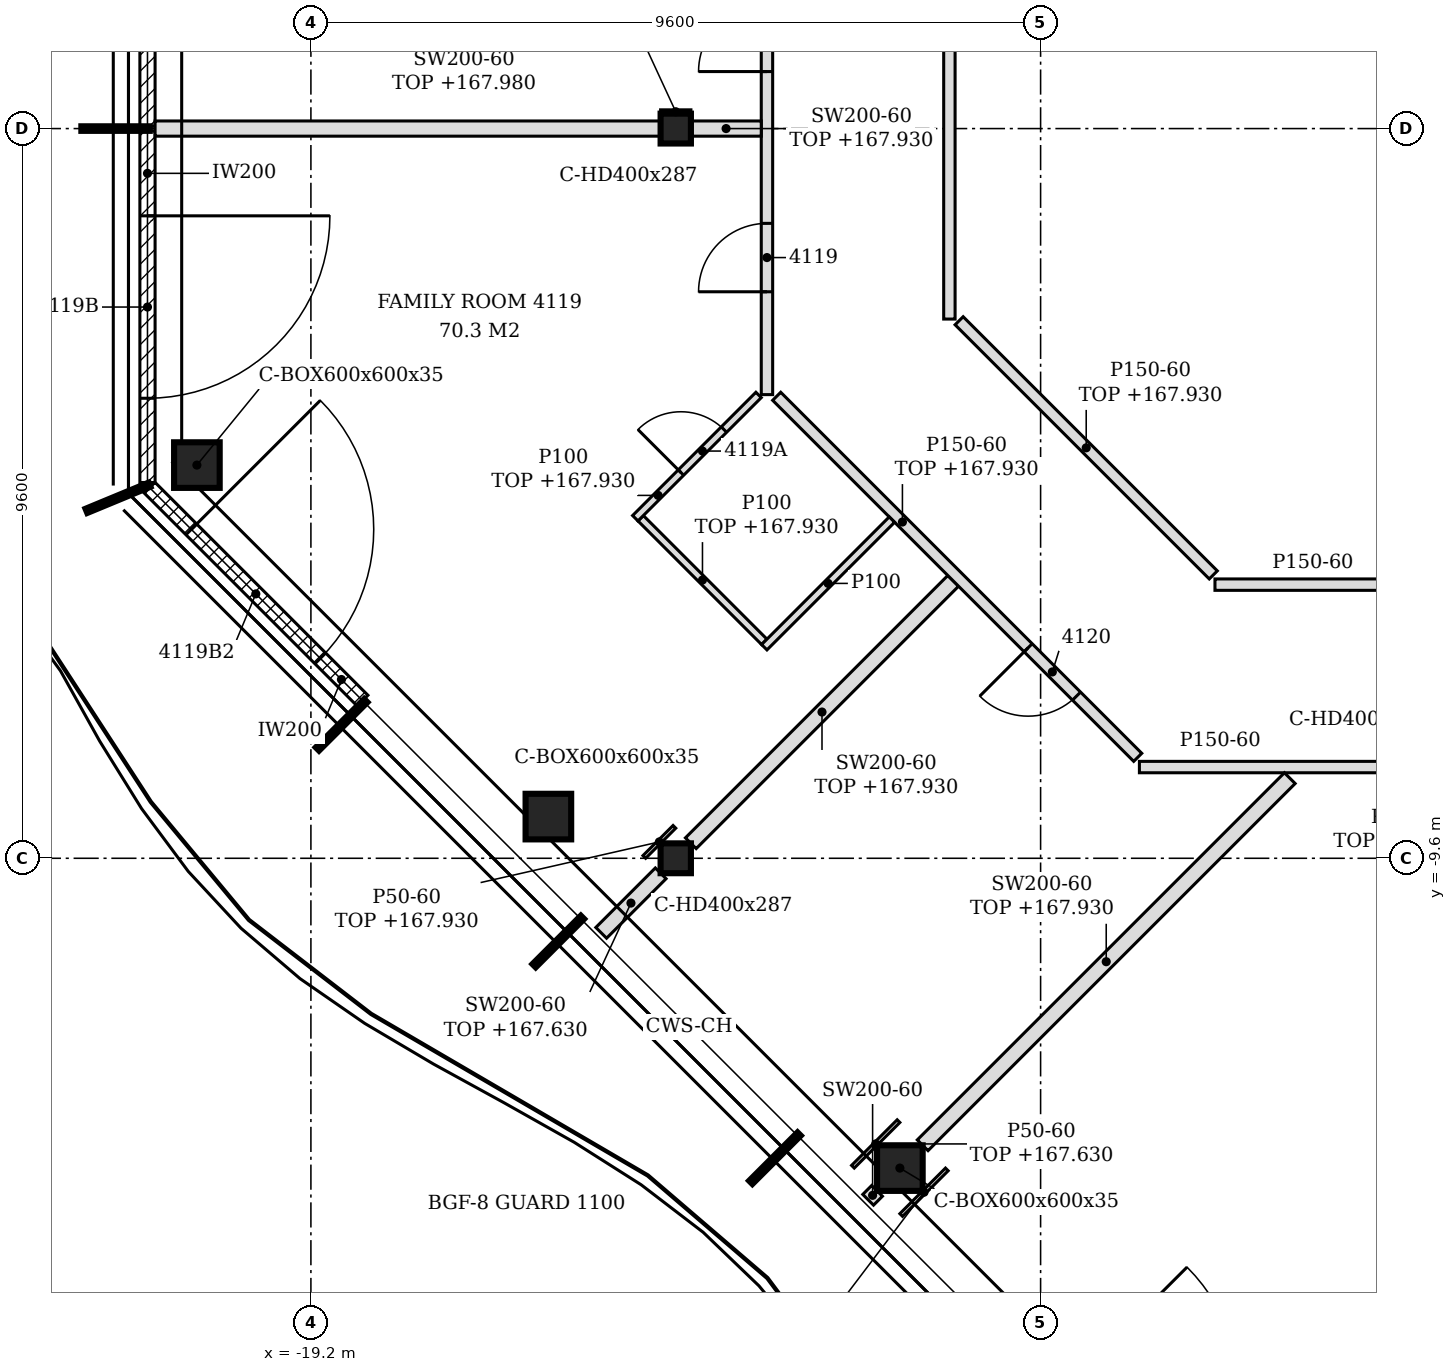
"""IFC4 building model, lengths in metres.
Left out: names, types, materials, properties, quantities, classifications, styles, units other than length and angle.
Written with IfcOpenShell. Run it as: python <this file> out.ifc"""

import sys

from ifc_helpers import new_model, si_unit, direction, frame, frame_2d, origin, origin_2d, place, context, subcontext, project, spatial, polyline, rectangle, hollow_rectangle, i_section, outline, extrude, element, fill, save


model = new_model("IFC4")
c1 = context("Model", 3, precision=1e-05, world=origin(), true_north=direction((0.0, 1.0)))
c2 = subcontext(c1, "Body", "Model", "MODEL_VIEW")
j1 = project(units=[si_unit("LENGTHUNIT", "METRE"), si_unit("PLANEANGLEUNIT", "RADIAN")], contexts=[c1])
p1 = place(None, origin())
s1 = spatial("IfcSite", under=j1, at=p1, CompositionType="ELEMENT")
p2 = place(p1, origin())
s2 = spatial("IfcBuilding", under=s1, at=p2, CompositionType="ELEMENT")
p3 = place(p2, frame((0.0, 0.0, 165.0)))
s3 = spatial("IfcBuildingStorey", under=s2, at=p3, CompositionType="ELEMENT", Elevation=165.0)
for number, where, z_axis, x_axis in (
    (1, (-20.7, -4.427, -0.15), (0.0, 0.0, 1.0), (1.0, 0.0, 0.0)),
    (2, (-16.076, -9.052, -0.15), (0.0, 0.0, 1.0), (1.0, 0.0, 0.0)),
    (3, (-11.451, -13.676, -0.15), (0.0, 0.0, 1.0), (1.0, 0.0, 0.0)),
):
    element("IfcColumn", number, at=place(p3, frame(where, z_axis=z_axis, x_axis=x_axis)), inside=s3, PredefinedType="COLUMN", context=c2, shape_type="SweptSolid", body=[
        extrude(hollow_rectangle(XDim=0.6, YDim=0.6, WallThickness=0.035, at=origin_2d()), origin(), (0.0, 0.0, 1.0), 3.6),
    ])
for number, where, z_axis, x_axis in (
    (4, (-14.4, -9.6, -0.15), (0.0, 0.0, 1.0), (1.0, 0.0, 0.0)),
    (5, (-14.4, 0.0, -0.15), (0.0, 0.0, 1.0), (1.0, 0.0, 0.0)),
):
    element("IfcColumn", number, at=place(p3, frame(where, z_axis=z_axis, x_axis=x_axis)), inside=s3, PredefinedType="COLUMN", context=c2, shape_type="SweptSolid", body=[
        extrude(i_section(OverallWidth=0.399, OverallDepth=0.393, WebThickness=0.023, FlangeThickness=0.037, FilletRadius=0.015, at=origin_2d()), origin(), (0.0, 0.0, 1.0), 3.6),
    ])
p4 = place(p3, frame((-21.35, 4.77, 0.0), z_axis=(0.0, 0.0, 1.0), x_axis=(0.0, -1.0, 0.0)))
e6 = element("IfcWall", 6, at=p4, inside=s3, PredefinedType="NOTDEFINED", context=c2, shape_type="SweptSolid", body=[
    extrude(rectangle(XDim=4.74, YDim=0.2, at=frame_2d((2.37, 0.0))), origin(), (0.0, 0.0, 1.0), 3.45),
])
p5 = place(p4, frame((1.17, 0.0, 0.0)))
e7 = element("IfcOpeningElement", 7, at=p5, cuts=e6, PredefinedType="OPENING", context=c2, shape_type="SweptSolid", body=[
    extrude(rectangle(XDim=2.4, YDim=2.4, at=frame_2d((1.2, 1.2))), frame((0.0, 0.11, 0.0), z_axis=(0.0, -1.0, 0.0), x_axis=(1.0, 0.0, 0.0)), (0.0, 0.0, 1.0), 0.22),
])
p6 = place(p3, frame((-21.35, -0.03, 0.0), z_axis=(0.0, 0.0, 1.0), x_axis=(0.0, -1.0, 0.0)))
e8 = element("IfcWall", 8, at=p6, inside=s3, PredefinedType="NOTDEFINED", context=c2, shape_type="SweptSolid", body=[
    extrude(rectangle(XDim=4.626, YDim=0.2, at=frame_2d((2.313, 0.0))), origin(), (0.0, 0.0, 1.0), 3.45),
])
p7 = place(p6, frame((1.118, 0.0, 0.0)))
e9 = element("IfcOpeningElement", 9, at=p7, cuts=e8, PredefinedType="OPENING", context=c2, shape_type="SweptSolid", body=[
    extrude(rectangle(XDim=2.4, YDim=2.4, at=frame_2d((1.2, 1.2))), frame((0.0, 0.11, 0.0), z_axis=(0.0, -1.0, 0.0), x_axis=(1.0, 0.0, 0.0)), (0.0, 0.0, 1.0), 0.22),
])
p8 = place(p3, frame((-21.322, -4.725, 0.0), z_axis=(0.0, 0.0, 1.0), x_axis=(0.707106781187, -0.707106781187, 0.0)))
e10 = element("IfcWall", 10, at=p8, inside=s3, PredefinedType="NOTDEFINED", context=c2, shape_type="SweptSolid", body=[
    extrude(rectangle(XDim=3.962, YDim=0.2, at=frame_2d((1.981, 0.0))), origin(), (0.0, 0.0, 1.0), 3.45),
])
p9 = place(p8, frame((0.775, 0.0, 0.0)))
e11 = element("IfcOpeningElement", 11, at=p9, cuts=e10, PredefinedType="OPENING", context=c2, shape_type="SweptSolid", body=[
    extrude(rectangle(XDim=2.4, YDim=2.4, at=frame_2d((1.2, 1.2))), frame((0.0, 0.11, 0.0), z_axis=(0.0, -1.0, 0.0), x_axis=(1.0, 0.0, 0.0)), (0.0, 0.0, 1.0), 0.22),
])
p10 = place(p3, frame((-11.869, -14.093, 0.0), z_axis=(0.0, 0.0, 1.0), x_axis=(0.707106781187, 0.707106781187, 0.0)))
e12 = element("IfcWall", 12, at=p10, inside=s3, PredefinedType="PARTITIONING", context=c2, shape_type="SweptSolid", body=[
    extrude(rectangle(XDim=0.166, YDim=0.2, at=frame_2d((0.083, 0.0))), origin(), (0.0, 0.0, 1.0), 3.45),
])
p11 = place(p3, frame((-11.152, -13.375, 0.0), z_axis=(0.0, 0.0, 1.0), x_axis=(0.707106781187, 0.707106781187, 0.0)))
e13 = element("IfcWall", 13, at=p11, inside=s3, PredefinedType="PARTITIONING", context=c2, shape_type="SweptSolid", body=[
    extrude(rectangle(XDim=6.83, YDim=0.2, at=frame_2d((3.415, 0.0))), origin(), (0.0, 0.0, 1.0), 2.93),
])
p12 = place(p3, frame((-15.381, -10.581, 0.0), z_axis=(0.0, 0.0, 1.0), x_axis=(0.707217034054, 0.706996511125, 0.0)))
e14 = element("IfcWall", 14, at=p12, inside=s3, PredefinedType="PARTITIONING", context=c2, shape_type="SweptSolid", body=[
    extrude(rectangle(XDim=1.107, YDim=0.2, at=frame_2d((0.554, 0.0))), origin(), (0.0, 0.0, 1.0), 2.63),
])
p13 = place(p3, frame((-14.202, -9.402, 0.0), z_axis=(0.0, 0.0, 1.0), x_axis=(0.707081776084, 0.707131785404, 0.0)))
e15 = element("IfcWall", 15, at=p13, inside=s3, PredefinedType="PARTITIONING", context=c2, shape_type="SweptSolid", body=[
    extrude(rectangle(XDim=4.882, YDim=0.2, at=frame_2d((2.441, 0.0))), origin(), (0.0, 0.0, 1.0), 2.93),
])
p14 = place(p3, frame((-8.3, -8.4, 0.0), z_axis=(0.0, 0.0, 1.0), x_axis=(1.0, 0.0, 0.0)))
e16 = element("IfcWall", 16, at=p14, inside=s3, PredefinedType="PARTITIONING", context=c2, shape_type="SweptSolid", body=[
    extrude(rectangle(XDim=3.301, YDim=0.15, at=frame_2d((1.65, 0.0))), origin(), (0.0, 0.0, 1.0), 3.45),
])
p15 = place(p3, frame((-8.322, -8.272, 0.0), z_axis=(0.0, 0.0, 1.0), x_axis=(-0.707106781187, 0.707106781187, 0.0)))
e17 = element("IfcWall", 17, at=p15, inside=s3, PredefinedType="PARTITIONING", context=c2, shape_type="SweptSolid", body=[
    extrude(rectangle(XDim=6.718, YDim=0.15, at=frame_2d((3.359, 0.0))), origin(), (0.0, 0.0, 1.0), 2.93),
])
p16 = place(p15, frame((1.139, 0.0, 0.0)))
e18 = element("IfcOpeningElement", 18, at=p16, cuts=e17, PredefinedType="OPENING", context=c2, shape_type="SweptSolid", body=[
    extrude(rectangle(XDim=0.9, YDim=2.1, at=frame_2d((0.45, 1.05))), frame((0.0, 0.085, 0.0), z_axis=(0.0, -1.0, 0.0), x_axis=(1.0, 0.0, 0.0)), (0.0, 0.0, 1.0), 0.17),
])
p17 = place(p3, frame((-13.235, -6.753, 0.0), z_axis=(0.0, 0.0, 1.0), x_axis=(-0.707106781187, 0.707106781187, 0.0)))
e19 = element("IfcWall", 19, at=p17, inside=s3, PredefinedType="PARTITIONING", context=c2, shape_type="SweptSolid", body=[
    extrude(rectangle(XDim=2.3, YDim=0.1, at=frame_2d((1.15, 0.0))), origin(), (0.0, 0.0, 1.0), 2.93),
])
p18 = place(p3, frame((-13.235, -6.823, 0.0), z_axis=(0.0, 0.0, 1.0), x_axis=(0.707106781187, 0.707106781187, 0.0)))
e20 = element("IfcWall", 20, at=p18, inside=s3, PredefinedType="PARTITIONING", context=c2, shape_type="SweptSolid", body=[
    extrude(rectangle(XDim=2.375, YDim=0.1, at=frame_2d((1.188, 0.0))), origin(), (0.0, 0.0, 1.0), 3.45),
])
p19 = place(p3, frame((-7.306, -6.0, 0.0), z_axis=(0.0, 0.0, 1.0), x_axis=(1.0, 0.0, 0.0)))
e21 = element("IfcWall", 21, at=p19, inside=s3, PredefinedType="PARTITIONING", context=c2, shape_type="SweptSolid", body=[
    extrude(outline(polyline([(0.0, 0.0), (2.581, 0.0), (2.581, 2.83), (2.356, 2.83), (2.354, 3.45), (0.0, 3.45), (0.0, 0.0)])), frame((0.0, 0.075, 0.0), z_axis=(0.0, -1.0, 0.0), x_axis=(1.0, 0.0, 0.0)), (0.0, 0.0, 1.0), 0.15),
])
p20 = place(p3, frame((-7.328, -5.872, 0.0), z_axis=(0.0, 0.0, 1.0), x_axis=(-0.707106781187, 0.707106781187, 0.0)))
e22 = element("IfcWall", 22, at=p20, inside=s3, PredefinedType="PARTITIONING", context=c2, shape_type="SweptSolid", body=[
    extrude(rectangle(XDim=4.729, YDim=0.15, at=frame_2d((2.365, 0.0))), origin(), (0.0, 0.0, 1.0), 2.93),
])
p21 = place(p3, frame((-14.932, -5.126, 0.0), z_axis=(0.0, 0.0, 1.0), x_axis=(0.707106781187, 0.707106781187, 0.0)))
e23 = element("IfcWall", 23, at=p21, inside=s3, PredefinedType="PARTITIONING", context=c2, shape_type="SweptSolid", body=[
    extrude(rectangle(XDim=2.294, YDim=0.1, at=frame_2d((1.147, 0.0))), origin(), (0.0, 0.0, 1.0), 2.93),
])
p22 = place(p21, frame((0.85, 0.0, 0.0)))
e24 = element("IfcOpeningElement", 24, at=p22, cuts=e23, PredefinedType="OPENING", context=c2, shape_type="SweptSolid", body=[
    extrude(rectangle(XDim=0.8, YDim=2.1, at=frame_2d((0.4, 1.05))), frame((0.0, 0.06, 0.0), z_axis=(0.0, -1.0, 0.0), x_axis=(1.0, 0.0, 0.0)), (0.0, 0.0, 1.0), 0.12),
])
p23 = place(p3, frame((-13.2, -3.5, 0.0), z_axis=(0.0, 0.0, 1.0), x_axis=(0.0, 1.0, 0.0)))
e25 = element("IfcWall", 25, at=p23, inside=s3, PredefinedType="PARTITIONING", context=c2, shape_type="SweptSolid", body=[
    extrude(outline(polyline([(0.0, 0.0), (17.634, 0.0), (17.634, 3.45), (13.2, 3.45), (13.198, 2.93), (13.0, 2.93), (12.998, 3.45), (8.4, 3.45), (8.398, 2.93), (8.2, 2.93), (8.198, 3.45), (3.6, 3.45), (3.598, 2.93), (3.4, 2.93), (3.398, 3.45), (0.0, 3.45), (0.0, 0.0)])), frame((0.0, 0.075, 0.0), z_axis=(0.0, -1.0, 0.0), x_axis=(1.0, 0.0, 0.0)), (0.0, 0.0, 1.0), 0.15),
])
p24 = place(p23, frame((15.784, 0.0, 0.0)))
e26 = element("IfcOpeningElement", 26, at=p24, cuts=e25, PredefinedType="OPENING", context=c2, shape_type="SweptSolid", body=[
    extrude(rectangle(XDim=0.9, YDim=2.1, at=frame_2d((0.45, 1.05))), frame((0.0, 0.085, 0.0), z_axis=(0.0, -1.0, 0.0), x_axis=(1.0, 0.0, 0.0)), (0.0, 0.0, 1.0), 0.17),
])
p25 = place(p23, frame((11.45, 0.0, 0.0)))
e27 = element("IfcOpeningElement", 27, at=p25, cuts=e25, PredefinedType="OPENING", context=c2, shape_type="SweptSolid", body=[
    extrude(rectangle(XDim=0.9, YDim=2.1, at=frame_2d((0.45, 1.05))), frame((0.0, 0.085, 0.0), z_axis=(0.0, -1.0, 0.0), x_axis=(1.0, 0.0, 0.0)), (0.0, 0.0, 1.0), 0.17),
])
p26 = place(p23, frame((4.25, 0.0, 0.0)))
e28 = element("IfcOpeningElement", 28, at=p26, cuts=e25, PredefinedType="OPENING", context=c2, shape_type="SweptSolid", body=[
    extrude(rectangle(XDim=0.9, YDim=2.1, at=frame_2d((0.45, 1.05))), frame((0.0, 0.085, 0.0), z_axis=(0.0, -1.0, 0.0), x_axis=(1.0, 0.0, 0.0)), (0.0, 0.0, 1.0), 0.17),
])
p27 = place(p23, frame((1.353, 0.0, 0.0)))
e29 = element("IfcOpeningElement", 29, at=p27, cuts=e25, PredefinedType="OPENING", context=c2, shape_type="SweptSolid", body=[
    extrude(rectangle(XDim=0.9, YDim=2.1, at=frame_2d((0.45, 1.05))), frame((0.0, 0.085, 0.0), z_axis=(0.0, -1.0, 0.0), x_axis=(1.0, 0.0, 0.0)), (0.0, 0.0, 1.0), 0.17),
])
p28 = place(p3, frame((-10.8, -2.506, 0.0), z_axis=(0.0, 0.0, 1.0), x_axis=(0.0, 1.0, 0.0)))
e30 = element("IfcWall", 30, at=p28, inside=s3, PredefinedType="PARTITIONING", context=c2, shape_type="SweptSolid", body=[
    extrude(outline(polyline([(0.0, 0.0), (15.631, 0.0), (15.631, 3.45), (12.206, 3.45), (12.204, 2.93), (12.006, 2.93), (12.004, 3.45), (7.406, 3.45), (7.404, 2.93), (7.206, 2.93), (7.204, 3.45), (2.606, 3.45), (2.604, 2.93), (2.406, 2.93), (2.404, 3.45), (0.0, 3.45), (0.0, 0.0)])), frame((0.0, 0.075, 0.0), z_axis=(0.0, -1.0, 0.0), x_axis=(1.0, 0.0, 0.0)), (0.0, 0.0, 1.0), 0.15),
])
p29 = place(p3, frame((-21.25, 0.0, 0.0), z_axis=(0.0, 0.0, 1.0), x_axis=(1.0, 0.0, 0.0)))
e31 = element("IfcWall", 31, at=p29, inside=s3, PredefinedType="PARTITIONING", context=c2, shape_type="SweptSolid", body=[
    extrude(outline(polyline([(0.0, 0.0), (6.65, 0.0), (6.65, 2.98), (0.7, 2.98), (0.698, 2.93), (0.4, 2.93), (0.398, 2.98), (0.0, 2.98), (0.0, 0.0)])), frame((0.0, 0.1, 0.0), z_axis=(0.0, -1.0, 0.0), x_axis=(1.0, 0.0, 0.0)), (0.0, 0.0, 1.0), 0.2),
])
p30 = place(p3, frame((-14.2, 0.0, 0.0), z_axis=(0.0, 0.0, 1.0), x_axis=(1.0, 0.0, 0.0)))
e32 = element("IfcWall", 32, at=p30, inside=s3, PredefinedType="PARTITIONING", context=c2, shape_type="SweptSolid", body=[
    extrude(rectangle(XDim=0.926, YDim=0.2, at=frame_2d((0.463, 0.0))), origin(), (0.0, 0.0, 1.0), 2.93),
])
p31 = place(p3, frame((-12.069, -13.658, 0.0), z_axis=(0.0, 0.0, 1.0), x_axis=(0.707106781187, 0.707106781187, 0.0)))
e33 = element("IfcWall", 33, at=p31, inside=s3, PredefinedType="PARTITIONING", context=c2, shape_type="SweptSolid", body=[
    extrude(rectangle(XDim=0.848, YDim=0.05, at=frame_2d((0.424, 0.0))), origin(), (0.0, 0.0, 1.0), 2.63),
])
p32 = place(p3, frame((-11.434, -14.293, 0.0), z_axis=(0.0, 0.0, 1.0), x_axis=(0.707106781187, 0.707106781187, 0.0)))
e34 = element("IfcWall", 34, at=p32, inside=s3, PredefinedType="PARTITIONING", context=c2, shape_type="SweptSolid", body=[
    extrude(rectangle(XDim=0.849, YDim=0.05, at=frame_2d((0.424, 0.0))), origin(), (0.0, 0.0, 1.0), 2.93),
])
p33 = place(p3, frame((-14.814, -9.582, 0.0), z_axis=(0.0, 0.0, 1.0), x_axis=(0.707106781187, 0.707106781187, 0.0)))
e35 = element("IfcWall", 35, at=p33, inside=s3, PredefinedType="PARTITIONING", context=c2, shape_type="SweptSolid", body=[
    extrude(rectangle(XDim=0.56, YDim=0.05, at=frame_2d((0.28, 0.0))), origin(), (0.0, 0.0, 1.0), 2.93),
])
p34 = place(p3, frame((-14.6, 0.221, 0.0), z_axis=(0.0, 0.0, 1.0), x_axis=(1.0, 0.0, 0.0)))
e36 = element("IfcWall", 36, at=p34, inside=s3, PredefinedType="PARTITIONING", context=c2, shape_type="SweptSolid", body=[
    extrude(rectangle(XDim=0.399, YDim=0.05, at=frame_2d((0.2, 0.0))), origin(), (0.0, 0.0, 1.0), 2.93),
])
p35 = place(p7, origin())
e37 = element("IfcDoor", 37, at=p35, inside=s3, OperationType="SINGLE_SWING_LEFT", PredefinedType="DOOR", context=c2, shape_type="SweptSolid", body=[
    extrude(rectangle(XDim=2.4, YDim=2.4, at=frame_2d((1.2, 1.2))), frame((0.0, 0.025, 0.0), z_axis=(0.0, -1.0, 0.0), x_axis=(1.0, 0.0, 0.0)), (0.0, 0.0, 1.0), 0.05),
])
fill(e9, e37)
p36 = place(p9, origin())
e38 = element("IfcDoor", 38, at=p36, inside=s3, OperationType="SINGLE_SWING_LEFT", PredefinedType="DOOR", context=c2, shape_type="SweptSolid", body=[
    extrude(rectangle(XDim=2.4, YDim=2.4, at=frame_2d((1.2, 1.2))), frame((0.0, 0.025, 0.0), z_axis=(0.0, -1.0, 0.0), x_axis=(1.0, 0.0, 0.0)), (0.0, 0.0, 1.0), 0.05),
])
fill(e11, e38)
p37 = place(p26, origin())
e39 = element("IfcDoor", 39, at=p37, inside=s3, OperationType="SINGLE_SWING_LEFT", PredefinedType="DOOR", context=c2, shape_type="SweptSolid", body=[
    extrude(rectangle(XDim=0.9, YDim=2.1, at=frame_2d((0.45, 1.05))), frame((0.0, 0.025, 0.0), z_axis=(0.0, -1.0, 0.0), x_axis=(1.0, 0.0, 0.0)), (0.0, 0.0, 1.0), 0.05),
])
fill(e28, e39)
p38 = place(p27, origin())
e40 = element("IfcDoor", 40, at=p38, inside=s3, OperationType="SINGLE_SWING_LEFT", PredefinedType="DOOR", context=c2, shape_type="SweptSolid", body=[
    extrude(rectangle(XDim=0.9, YDim=2.1, at=frame_2d((0.45, 1.05))), frame((0.0, 0.025, 0.0), z_axis=(0.0, -1.0, 0.0), x_axis=(1.0, 0.0, 0.0)), (0.0, 0.0, 1.0), 0.05),
])
fill(e29, e40)
p39 = place(p22, origin())
e41 = element("IfcDoor", 41, at=p39, inside=s3, OperationType="SINGLE_SWING_LEFT", PredefinedType="DOOR", context=c2, shape_type="SweptSolid", body=[
    extrude(rectangle(XDim=0.8, YDim=2.1, at=frame_2d((0.4, 1.05))), frame((0.0, 0.025, 0.0), z_axis=(0.0, -1.0, 0.0), x_axis=(1.0, 0.0, 0.0)), (0.0, 0.0, 1.0), 0.05),
])
fill(e24, e41)
p40 = place(p16, origin())
e42 = element("IfcDoor", 42, at=p40, inside=s3, OperationType="SINGLE_SWING_RIGHT", PredefinedType="DOOR", context=c2, shape_type="SweptSolid", body=[
    extrude(rectangle(XDim=0.9, YDim=2.1, at=frame_2d((0.45, 1.05))), frame((0.0, 0.025, 0.0), z_axis=(0.0, -1.0, 0.0), x_axis=(1.0, 0.0, 0.0)), (0.0, 0.0, 1.0), 0.05),
])
fill(e18, e42)
save(model, sys.argv[1])
